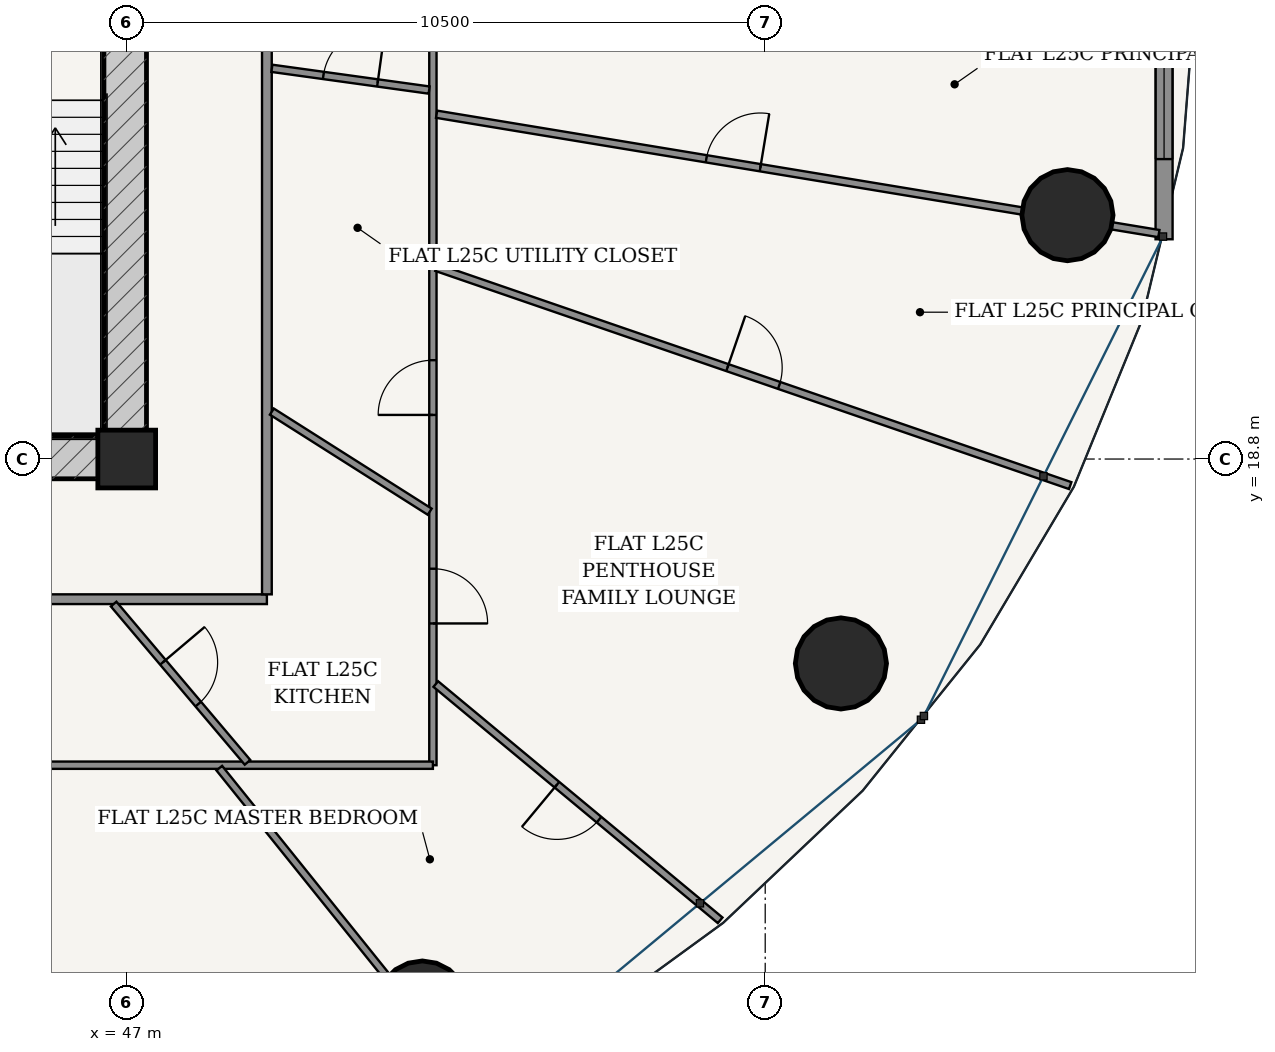
"""IFC4 building model, lengths in metres.
Left out: names, types, materials, properties, quantities, classifications, styles, units other than length and angle.
Written with IfcOpenShell. Run it as: python <this file> out.ifc"""

import sys

from ifc_helpers import new_model, si_unit, direction, frame, frame_2d, origin, origin_2d, place, context, subcontext, project, spatial, rectangle, hollow_circle, extrude, source, transform, mapped, element, fill, save


model = new_model("IFC4")
c1 = context("Model", 3, precision=1e-05, world=origin(), true_north=direction((-0.2419218956, 0.970295726276)))
c2 = subcontext(c1, "Body", "Model", "MODEL_VIEW")
j1 = project(units=[si_unit("LENGTHUNIT", "METRE"), si_unit("PLANEANGLEUNIT", "RADIAN")], contexts=[c1])
p1 = place(None, origin())
s1 = spatial("IfcSite", under=j1, at=p1, CompositionType="ELEMENT")
p2 = place(p1, origin())
s2 = spatial("IfcBuilding", under=s1, at=p2, CompositionType="ELEMENT")
p3 = place(p2, frame((0.0, 0.0, 97.8)))
s3 = spatial("IfcBuildingStorey", under=s2, at=p3, CompositionType="ELEMENT", Elevation=97.8)
p4 = place(p3, frame((47.0, 18.8, 0.0), z_axis=(0.0, 0.0, 1.0), x_axis=(1.0, 0.0, 0.0)))
e1 = element("IfcColumn", 1, at=p4, inside=s3, PredefinedType="COLUMN", context=c2, shape_type="SweptSolid", body=[
    extrude(rectangle(XDim=0.95, YDim=0.95, at=origin_2d()), origin(), (0.0, 0.0, 1.0), 3.6),
])
p5 = place(p3, frame((28.675, 18.825, 0.0), z_axis=(0.0, 0.0, 1.0), x_axis=(1.0, 0.0, 0.0)))
e2 = element("IfcWall", 2, at=p5, inside=s3, PredefinedType="SHEAR", context=c2, shape_type="SweptSolid", body=[
    extrude(rectangle(XDim=18.65, YDim=0.7, at=frame_2d((9.325, 0.0))), origin(), (0.0, 0.0, 1.0), 3.325),
])
p6 = place(p5, frame((8.9, 0.0, 0.0)))
e3 = element("IfcOpeningElement", 3, at=p6, cuts=e2, PredefinedType="OPENING", context=c2, shape_type="SweptSolid", body=[
    extrude(rectangle(XDim=0.85, YDim=2.1, at=frame_2d((0.425, 1.05))), frame((0.0, 0.36, 0.0), z_axis=(0.0, -1.0, 0.0), x_axis=(1.0, 0.0, 0.0)), (0.0, 0.0, 1.0), 0.72),
])
p7 = place(p3, frame((46.975, 19.175, 0.0), z_axis=(0.0, 0.0, 1.0), x_axis=(0.0, 1.0, 0.0)))
e4 = element("IfcWall", 4, at=p7, inside=s3, PredefinedType="SHEAR", context=c2, shape_type="SweptSolid", body=[
    extrude(rectangle(XDim=15.25, YDim=0.7, at=frame_2d((7.625, 0.0))), origin(), (0.0, 0.0, 1.0), 3.325),
])
p8 = place(p7, frame((9.875, 0.0, 0.0)))
e5 = element("IfcOpeningElement", 5, at=p8, cuts=e4, PredefinedType="OPENING", context=c2, shape_type="SweptSolid", body=[
    extrude(rectangle(XDim=1.5, YDim=2.2, at=frame_2d((0.75, 1.1))), frame((0.0, 0.36, 0.0), z_axis=(0.0, -1.0, 0.0), x_axis=(1.0, 0.0, 0.0)), (0.0, 0.0, 1.0), 0.72),
])
for number, where, z_axis, x_axis in (
    (6, (51.862, 9.796, 0.0), (0.0, 0.0, 1.0), (1.0, 0.0, 0.0)),
    (7, (58.745, 15.438, 0.0), (0.0, 0.0, 1.0), (1.0, 0.0, 0.0)),
    (8, (62.471, 22.81, 0.0), (0.0, 0.0, 1.0), (1.0, 0.0, 0.0)),
):
    element("IfcColumn", number, at=place(p3, frame(where, z_axis=z_axis, x_axis=x_axis)), inside=s3, PredefinedType="COLUMN", context=c2, shape_type="SweptSolid", body=[
        extrude(hollow_circle(Radius=0.75, WallThickness=0.045, at=origin_2d()), origin(), (0.0, 0.0, 1.0), 3.6),
    ])
p9 = place(p3, frame((64.06, 22.414, 0.0), z_axis=(0.0, 0.0, 1.0), x_axis=(0.0, 1.0, 0.0)))
e9 = element("IfcWall", 9, at=p9, inside=s3, PredefinedType="SOLIDWALL", context=c2, shape_type="SweptSolid", body=[
    extrude(rectangle(XDim=8.771, YDim=0.28, at=frame_2d((4.386, 0.0))), origin(), (0.0, 0.0, 1.0), 3.325),
])
p10 = place(p9, frame((1.318, 0.0, 0.85)))
e10 = element("IfcOpeningElement", 10, at=p10, cuts=e9, PredefinedType="OPENING", context=c2, shape_type="SweptSolid", body=[
    extrude(rectangle(XDim=2.1, YDim=1.95, at=frame_2d((1.05, 0.975))), frame((0.0, 0.15, 0.0), z_axis=(0.0, -1.0, 0.0), x_axis=(1.0, 0.0, 0.0)), (0.0, 0.0, 1.0), 0.3),
])
p11 = place(p9, frame((5.353, 0.0, 0.85)))
e11 = element("IfcOpeningElement", 11, at=p11, cuts=e9, PredefinedType="OPENING", context=c2, shape_type="SweptSolid", body=[
    extrude(rectangle(XDim=2.1, YDim=1.95, at=frame_2d((1.05, 0.975))), frame((0.0, 0.15, 0.0), z_axis=(0.0, -1.0, 0.0), x_axis=(1.0, 0.0, 0.0)), (0.0, 0.0, 1.0), 0.3),
])
p12 = place(p3, frame((26.695, 16.495, 0.0), z_axis=(0.0, 0.0, 1.0), x_axis=(1.0, 0.0, 0.0)))
e12 = element("IfcWall", 12, at=p12, inside=s3, PredefinedType="PARTITIONING", context=c2, shape_type="SweptSolid", body=[
    extrude(rectangle(XDim=22.61, YDim=0.16, at=frame_2d((11.305, 0.0))), origin(), (0.0, 0.0, 1.0), 2.767),
])
p13 = place(p12, frame((1.688, 0.0, 0.0)))
e13 = element("IfcOpeningElement", 13, at=p13, cuts=e12, PredefinedType="OPENING", context=c2, shape_type="SweptSolid", body=[
    extrude(rectangle(XDim=0.98, YDim=2.2, at=frame_2d((0.49, 1.1))), frame((0.0, 0.09, 0.0), z_axis=(0.0, -1.0, 0.0), x_axis=(1.0, 0.0, 0.0)), (0.0, 0.0, 1.0), 0.18),
])
p14 = place(p12, frame((16.137, 0.0, 0.0)))
e14 = element("IfcOpeningElement", 14, at=p14, cuts=e12, PredefinedType="OPENING", context=c2, shape_type="SweptSolid", body=[
    extrude(rectangle(XDim=0.98, YDim=2.2, at=frame_2d((0.49, 1.1))), frame((0.0, 0.09, 0.0), z_axis=(0.0, -1.0, 0.0), x_axis=(1.0, 0.0, 0.0)), (0.0, 0.0, 1.0), 0.18),
])
p15 = place(p3, frame((49.305, 16.575, 0.0), z_axis=(0.0, 0.0, 1.0), x_axis=(0.0, 1.0, 0.0)))
e15 = element("IfcWall", 15, at=p15, inside=s3, PredefinedType="PARTITIONING", context=c2, shape_type="SweptSolid", body=[
    extrude(rectangle(XDim=20.45, YDim=0.16, at=frame_2d((10.225, 0.0))), origin(), (0.0, 0.0, 1.0), 2.767),
])
p16 = place(p3, frame((52.035, 34.49, 0.0), z_axis=(0.0, 0.0, 1.0), x_axis=(0.0, -1.0, 0.0)))
e16 = element("IfcWall", 16, at=p16, inside=s3, PredefinedType="PARTITIONING", context=c2, shape_type="SweptSolid", body=[
    extrude(rectangle(XDim=20.725, YDim=0.12, at=frame_2d((10.362, 0.0))), origin(), (0.0, 0.0, 1.0), 2.767),
])
p17 = place(p16, frame((17.493, 0.0, 0.0)))
e17 = element("IfcOpeningElement", 17, at=p17, cuts=e16, PredefinedType="OPENING", context=c2, shape_type="SweptSolid", body=[
    extrude(rectangle(XDim=0.9, YDim=2.15, at=frame_2d((0.45, 1.075))), frame((0.0, 0.07, 0.0), z_axis=(0.0, -1.0, 0.0), x_axis=(1.0, 0.0, 0.0)), (0.0, 0.0, 1.0), 0.14),
])
p18 = place(p16, frame((14.064, 0.0, 0.0)))
e18 = element("IfcOpeningElement", 18, at=p18, cuts=e16, PredefinedType="OPENING", context=c2, shape_type="SweptSolid", body=[
    extrude(rectangle(XDim=0.9, YDim=2.15, at=frame_2d((0.45, 1.075))), frame((0.0, 0.07, 0.0), z_axis=(0.0, -1.0, 0.0), x_axis=(1.0, 0.0, 0.0)), (0.0, 0.0, 1.0), 0.14),
])
p19 = place(p3, frame((52.035, 13.765, 0.0), z_axis=(0.0, 0.0, 1.0), x_axis=(-1.0, 0.0, 0.0)))
e19 = element("IfcWall", 19, at=p19, inside=s3, PredefinedType="PARTITIONING", context=c2, shape_type="SweptSolid", body=[
    extrude(rectangle(XDim=17.054, YDim=0.12, at=frame_2d((8.527, 0.0))), origin(), (0.0, 0.0, 1.0), 2.767),
])
p20 = place(p19, frame((7.203, 0.0, 0.0)))
e20 = element("IfcOpeningElement", 20, at=p20, cuts=e19, PredefinedType="OPENING", context=c2, shape_type="SweptSolid", body=[
    extrude(rectangle(XDim=0.9, YDim=2.15, at=frame_2d((0.45, 1.075))), frame((0.0, 0.07, 0.0), z_axis=(0.0, -1.0, 0.0), x_axis=(1.0, 0.0, 0.0)), (0.0, 0.0, 1.0), 0.14),
])
p21 = place(p3, frame((48.522, 13.717, 0.0), z_axis=(0.0, 0.0, 1.0), x_axis=(0.626707979732, -0.77925419995, 0.0)))
e21 = element("IfcWall", 21, at=p21, inside=s3, PredefinedType="PARTITIONING", context=c2, shape_type="SweptSolid", body=[
    extrude(rectangle(XDim=6.679, YDim=0.12, at=frame_2d((3.339, 0.0))), origin(), (0.0, 0.0, 1.0), 2.767),
])
p22 = place(p3, frame((52.083, 15.1, 0.0), z_axis=(0.0, 0.0, 1.0), x_axis=(0.769161827891, -0.63905405289, 0.0)))
e22 = element("IfcWall", 22, at=p22, inside=s3, PredefinedType="PARTITIONING", context=c2, shape_type="SweptSolid", body=[
    extrude(rectangle(XDim=6.08, YDim=0.12, at=frame_2d((3.04, 0.0))), origin(), (0.0, 0.0, 1.0), 2.767),
])
p23 = place(p22, frame((2.59, 0.0, 0.0)))
e23 = element("IfcOpeningElement", 23, at=p23, cuts=e22, PredefinedType="OPENING", context=c2, shape_type="SweptSolid", body=[
    extrude(rectangle(XDim=0.9, YDim=2.15, at=frame_2d((0.45, 1.075))), frame((0.0, 0.07, 0.0), z_axis=(0.0, -1.0, 0.0), x_axis=(1.0, 0.0, 0.0)), (0.0, 0.0, 1.0), 0.14),
])
p24 = place(p3, frame((52.094, 21.95, 0.0), z_axis=(0.0, 0.0, 1.0), x_axis=(0.945573120726, -0.32540970078, 0.0)))
e24 = element("IfcWall", 24, at=p24, inside=s3, PredefinedType="PARTITIONING", context=c2, shape_type="SweptSolid", body=[
    extrude(rectangle(XDim=11.022, YDim=0.12, at=frame_2d((5.511, 0.0))), origin(), (0.0, 0.0, 1.0), 2.767),
])
p25 = place(p24, frame((5.061, 0.0, 0.0)))
e25 = element("IfcOpeningElement", 25, at=p25, cuts=e24, PredefinedType="OPENING", context=c2, shape_type="SweptSolid", body=[
    extrude(rectangle(XDim=0.9, YDim=2.15, at=frame_2d((0.45, 1.075))), frame((0.0, 0.07, 0.0), z_axis=(0.0, -1.0, 0.0), x_axis=(1.0, 0.0, 0.0)), (0.0, 0.0, 1.0), 0.14),
])
p26 = place(p3, frame((52.096, 24.47, 0.0), z_axis=(0.0, 0.0, 1.0), x_axis=(0.986618264768, -0.163047231274, 0.0)))
e26 = element("IfcWall", 26, at=p26, inside=s3, PredefinedType="PARTITIONING", context=c2, shape_type="SweptSolid", body=[
    extrude(rectangle(XDim=12.039, YDim=0.12, at=frame_2d((6.02, 0.0))), origin(), (0.0, 0.0, 1.0), 2.767),
])
p27 = place(p26, frame((4.496, 0.0, 0.0)))
e27 = element("IfcOpeningElement", 27, at=p27, cuts=e26, PredefinedType="OPENING", context=c2, shape_type="SweptSolid", body=[
    extrude(rectangle(XDim=0.9, YDim=2.15, at=frame_2d((0.45, 1.075))), frame((0.0, 0.07, 0.0), z_axis=(0.0, -1.0, 0.0), x_axis=(1.0, 0.0, 0.0)), (0.0, 0.0, 1.0), 0.14),
])
p28 = place(p3, frame((46.785, 16.415, 0.0), z_axis=(0.0, 0.0, 1.0), x_axis=(0.64582345164, -0.76348678398, 0.0)))
e28 = element("IfcWall", 28, at=p28, inside=s3, PredefinedType="PARTITIONING", context=c2, shape_type="SweptSolid", body=[
    extrude(rectangle(XDim=3.409, YDim=0.12, at=frame_2d((1.705, 0.0))), origin(), (0.0, 0.0, 1.0), 3.004),
])
p29 = place(p28, frame((1.254, 0.0, 0.0)))
e29 = element("IfcOpeningElement", 29, at=p29, cuts=e28, PredefinedType="OPENING", context=c2, shape_type="SweptSolid", body=[
    extrude(rectangle(XDim=0.9, YDim=2.15, at=frame_2d((0.45, 1.075))), frame((0.0, 0.07, 0.0), z_axis=(0.0, -1.0, 0.0), x_axis=(1.0, 0.0, 0.0)), (0.0, 0.0, 1.0), 0.14),
])
p30 = place(p3, frame((49.387, 19.58, 0.0), z_axis=(0.0, 0.0, 1.0), x_axis=(0.844540118368, -0.535492286094, 0.0)))
e30 = element("IfcWall", 30, at=p30, inside=s3, PredefinedType="PARTITIONING", context=c2, shape_type="SweptSolid", body=[
    extrude(rectangle(XDim=3.074, YDim=0.12, at=frame_2d((1.537, 0.0))), origin(), (0.0, 0.0, 1.0), 3.325),
])
p31 = place(p3, frame((49.387, 25.225, 0.0), z_axis=(0.0, 0.0, 1.0), x_axis=(0.990575253555, -0.136969584375, 0.0)))
e31 = element("IfcWall", 31, at=p31, inside=s3, PredefinedType="PARTITIONING", context=c2, shape_type="SweptSolid", body=[
    extrude(rectangle(XDim=2.611, YDim=0.12, at=frame_2d((1.306, 0.0))), origin(), (0.0, 0.0, 1.0), 3.325),
])
p32 = place(p31, frame((0.856, 0.0, 0.0)))
e32 = element("IfcOpeningElement", 32, at=p32, cuts=e31, PredefinedType="OPENING", context=c2, shape_type="SweptSolid", body=[
    extrude(rectangle(XDim=0.9, YDim=2.15, at=frame_2d((0.45, 1.075))), frame((0.0, 0.07, 0.0), z_axis=(0.0, -1.0, 0.0), x_axis=(1.0, 0.0, 0.0)), (0.0, 0.0, 1.0), 0.14),
])
m1 = source(origin(), c2, "Body", "SweptSolid", [
    extrude(rectangle(XDim=2.1, YDim=1.95, at=frame_2d((1.05, 0.975))), frame((0.0, 0.03, 0.0), z_axis=(0.0, -1.0, 0.0), x_axis=(1.0, 0.0, 0.0)), (0.0, 0.0, 1.0), 0.06),
])
p33 = place(p10, origin())
e33 = element("IfcWindow", 33, at=p33, inside=s3, PartitioningType="SINGLE_PANEL", PredefinedType="WINDOW", context=c2, shape_type="MappedRepresentation", body=[
    mapped(m1, transform((0.0, 0.0, 0.0), scale=1.0)),
])
fill(e10, e33)
m2 = source(origin(), c2, "Body", "SweptSolid", [
    extrude(rectangle(XDim=0.9, YDim=2.15, at=frame_2d((0.45, 1.075))), frame((0.0, 0.025, 0.0), z_axis=(0.0, -1.0, 0.0), x_axis=(1.0, 0.0, 0.0)), (0.0, 0.0, 1.0), 0.05),
])
p34 = place(p29, origin())
e34 = element("IfcDoor", 34, at=p34, inside=s3, OperationType="SINGLE_SWING_LEFT", PredefinedType="DOOR", context=c2, shape_type="MappedRepresentation", body=[
    mapped(m2, transform((0.0, 0.0, 0.0), scale=1.0)),
])
fill(e29, e34)
p35 = place(p17, origin())
e35 = element("IfcDoor", 35, at=p35, inside=s3, OperationType="SINGLE_SWING_RIGHT", PredefinedType="DOOR", context=c2, shape_type="MappedRepresentation", body=[
    mapped(m2, transform((0.0, 0.0, 0.0), scale=1.0)),
])
fill(e17, e35)
p36 = place(p18, frame((0.9, 0.0, 0.0), z_axis=(0.0, 0.0, 1.0), x_axis=(-1.0, 0.0, 0.0)))
e36 = element("IfcDoor", 36, at=p36, inside=s3, OperationType="SINGLE_SWING_LEFT", PredefinedType="DOOR", context=c2, shape_type="MappedRepresentation", body=[
    mapped(m2, transform((0.0, 0.0, 0.0), scale=1.0)),
])
fill(e18, e36)
p37 = place(p32, origin())
e37 = element("IfcDoor", 37, at=p37, inside=s3, OperationType="SINGLE_SWING_RIGHT", PredefinedType="DOOR", context=c2, shape_type="MappedRepresentation", body=[
    mapped(m2, transform((0.0, 0.0, 0.0), scale=1.0)),
])
fill(e32, e37)
p38 = place(p23, frame((0.9, 0.0, 0.0), z_axis=(0.0, 0.0, 1.0), x_axis=(-1.0, 0.0, 0.0)))
e38 = element("IfcDoor", 38, at=p38, inside=s3, OperationType="SINGLE_SWING_RIGHT", PredefinedType="DOOR", context=c2, shape_type="MappedRepresentation", body=[
    mapped(m2, transform((0.0, 0.0, 0.0), scale=1.0)),
])
fill(e23, e38)
p39 = place(p25, origin())
e39 = element("IfcDoor", 39, at=p39, inside=s3, OperationType="SINGLE_SWING_LEFT", PredefinedType="DOOR", context=c2, shape_type="MappedRepresentation", body=[
    mapped(m2, transform((0.0, 0.0, 0.0), scale=1.0)),
])
fill(e25, e39)
p40 = place(p27, origin())
e40 = element("IfcDoor", 40, at=p40, inside=s3, OperationType="SINGLE_SWING_RIGHT", PredefinedType="DOOR", context=c2, shape_type="MappedRepresentation", body=[
    mapped(m2, transform((0.0, 0.0, 0.0), scale=1.0)),
])
fill(e27, e40)
save(model, sys.argv[1])
